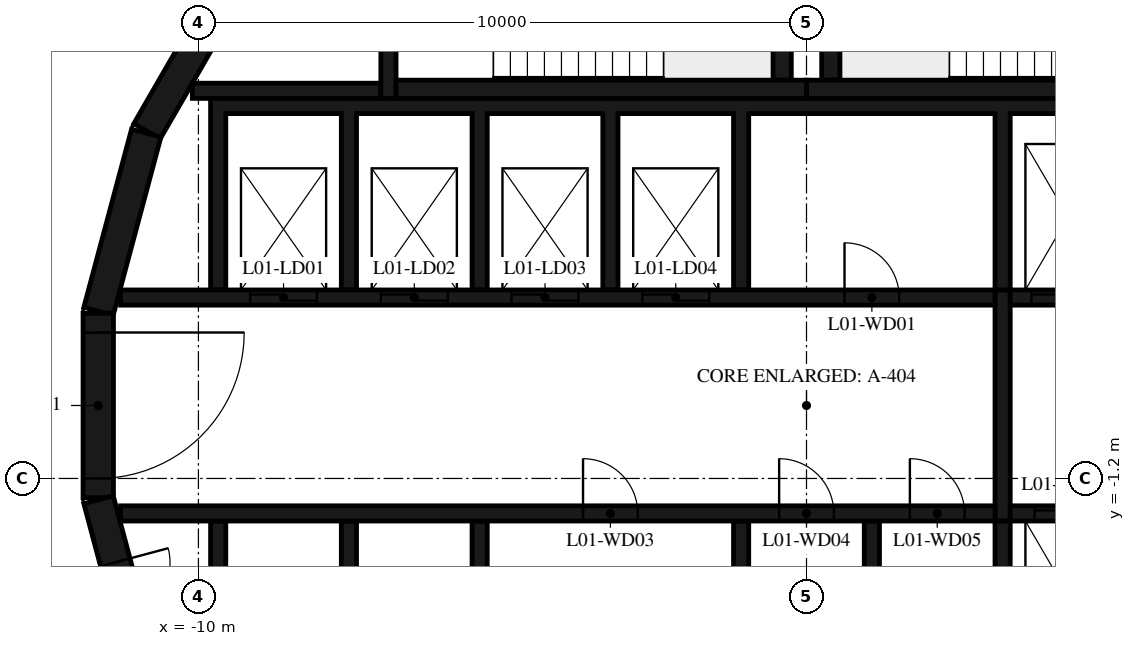
"""IFC4 building model, lengths in metres.
Left out: names, types, materials, properties, quantities, classifications, styles, units other than length and angle.
Written with IfcOpenShell. Run it as: python <this file> out.ifc"""

import sys

from ifc_helpers import new_model, si_unit, direction, frame, frame_2d, origin, place, context, subcontext, project, spatial, polyline, rectangle, outline, extrude, element, fill, save


model = new_model("IFC4")
c1 = context("Model", 3, precision=1e-05, world=origin(), true_north=direction((0.0, 1.0)))
c2 = subcontext(c1, "Body", "Model", "MODEL_VIEW")
j1 = project(units=[si_unit("LENGTHUNIT", "METRE"), si_unit("PLANEANGLEUNIT", "RADIAN")], contexts=[c1])
p1 = place(None, origin())
s1 = spatial("IfcSite", under=j1, at=p1, CompositionType="ELEMENT")
p2 = place(p1, origin())
s2 = spatial("IfcBuilding", under=s1, at=p2, CompositionType="ELEMENT")
p3 = place(p2, frame((0.0, 0.0, 9.0)))
s3 = spatial("IfcBuildingStorey", under=s2, at=p3, CompositionType="ELEMENT", Elevation=9.0)
for number, where, z_axis, x_axis in (
    (1, (-9.329, 7.137, 0.0), (0.0, 0.0, 1.0), (-0.5, -0.866, 0.0)),
    (2, (-10.858, 4.479, 0.0), (0.0, 0.0, 1.0), (-0.259, -0.966, 0.0)),
):
    element("IfcWall", number, at=place(p3, frame(where, z_axis=z_axis, x_axis=x_axis)), inside=s3, PredefinedType="SHEAR", context=c2, shape_type="SweptSolid", body=[
        extrude(rectangle(XDim=3.033, YDim=0.5, at=frame_2d((1.516, 0.0))), origin(), (0.0, 0.0, 1.0), 4.42),
    ])
p4 = place(p3, frame((-11.647, 1.516, 0.0), z_axis=(0.0, 0.0, 1.0), x_axis=(0.0, -1.0, 0.0)))
e3 = element("IfcWall", 3, at=p4, inside=s3, PredefinedType="SHEAR", context=c2, shape_type="SweptSolid", body=[
    extrude(rectangle(XDim=3.033, YDim=0.5, at=frame_2d((1.516, 0.0))), origin(), (0.0, 0.0, 1.0), 4.42),
])
p5 = place(p4, frame((0.316, 0.0, 0.0)))
e4 = element("IfcOpeningElement", 4, at=p5, cuts=e3, PredefinedType="OPENING", context=c2, shape_type="SweptSolid", body=[
    extrude(rectangle(XDim=2.4, YDim=2.1, at=frame_2d((1.2, 1.05))), frame((0.0, 0.26, 0.0), z_axis=(0.0, -1.0, 0.0), x_axis=(1.0, 0.0, 0.0)), (0.0, 0.0, 1.0), 0.52),
])
p6 = place(p3, frame((-11.643, -1.55, 0.0), z_axis=(0.0, 0.0, 1.0), x_axis=(0.258734743916, -0.965948410781, 0.0)))
e5 = element("IfcWall", 5, at=p6, inside=s3, PredefinedType="SHEAR", context=c2, shape_type="SweptSolid", body=[
    extrude(rectangle(XDim=3.033, YDim=0.5, at=frame_2d((1.516, 0.0))), origin(), (0.0, 0.0, 1.0), 4.42),
])
p7 = place(p6, frame((1.066, 0.0, 0.0)))
e6 = element("IfcOpeningElement", 6, at=p7, cuts=e5, PredefinedType="OPENING", context=c2, shape_type="SweptSolid", body=[
    extrude(rectangle(XDim=0.9, YDim=2.1, at=frame_2d((0.45, 1.05))), frame((0.0, 0.26, 0.0), z_axis=(0.0, -1.0, 0.0), x_axis=(1.0, 0.0, 0.0)), (0.0, 0.0, 1.0), 0.52),
])
p8 = place(p3, frame((0.0, 5.2, 0.0), z_axis=(0.0, 0.0, 1.0), x_axis=(1.0, 0.0, 0.0)))
e7 = element("IfcWall", 7, at=p8, inside=s3, PredefinedType="SHEAR", context=c2, shape_type="SweptSolid", body=[
    extrude(rectangle(XDim=6.75, YDim=0.3, at=frame_2d((3.375, 0.0))), origin(), (0.0, 0.0, 1.0), 4.42),
])
p9 = place(p3, frame((0.4, 5.35, 0.0), z_axis=(0.0, 0.0, 1.0), x_axis=(0.0, 1.0, 0.0)))
e8 = element("IfcWall", 8, at=p9, inside=s3, PredefinedType="SHEAR", context=c2, shape_type="SweptSolid", body=[
    extrude(rectangle(XDim=3.32, YDim=0.3, at=frame_2d((1.66, 0.0))), origin(), (0.0, 0.0, 1.0), 4.42),
])
p10 = place(p3, frame((-6.75, 5.2, 0.0), z_axis=(0.0, 0.0, 1.0), x_axis=(1.0, 0.0, 0.0)))
e9 = element("IfcWall", 9, at=p10, inside=s3, PredefinedType="SHEAR", context=c2, shape_type="SweptSolid", body=[
    extrude(rectangle(XDim=6.75, YDim=0.3, at=frame_2d((3.375, 0.0))), origin(), (0.0, 0.0, 1.0), 4.42),
])
p11 = place(p3, frame((-0.4, 5.35, 0.0), z_axis=(0.0, 0.0, 1.0), x_axis=(0.0, 1.0, 0.0)))
e10 = element("IfcWall", 10, at=p11, inside=s3, PredefinedType="SHEAR", context=c2, shape_type="SweptSolid", body=[
    extrude(rectangle(XDim=3.32, YDim=0.3, at=frame_2d((1.66, 0.0))), origin(), (0.0, 0.0, 1.0), 4.42),
])
p12 = place(p3, frame((-6.875, 8.97, 0.0), z_axis=(0.0, 0.0, 1.0), x_axis=(0.0, -1.0, 0.0)))
e11 = element("IfcWall", 11, at=p12, inside=s3, PredefinedType="SHEAR", context=c2, shape_type="SweptSolid", body=[
    extrude(rectangle(XDim=3.92, YDim=0.25, at=frame_2d((1.96, 0.0))), origin(), (0.0, 0.0, 1.0), 4.42),
])
p13 = place(p12, frame((1.61, 0.0, 0.0)))
e12 = element("IfcOpeningElement", 12, at=p13, cuts=e11, PredefinedType="OPENING", context=c2, shape_type="SweptSolid", body=[
    extrude(rectangle(XDim=1.2, YDim=2.1, at=frame_2d((0.6, 1.05))), frame((0.0, 0.135, 0.0), z_axis=(0.0, -1.0, 0.0), x_axis=(1.0, 0.0, 0.0)), (0.0, 0.0, 1.0), 0.27),
])
p14 = place(p3, frame((-7.0, 5.175, 0.0), z_axis=(0.0, 0.0, 1.0), x_axis=(-1.0, 0.0, 0.0)))
e13 = element("IfcWall", 13, at=p14, inside=s3, PredefinedType="SHEAR", context=c2, shape_type="SweptSolid", body=[
    extrude(rectangle(XDim=3.1, YDim=0.25, at=frame_2d((1.55, 0.0))), origin(), (0.0, 0.0, 1.0), 4.42),
])
p15 = place(p3, origin())
e14 = element("IfcWall", 14, at=p15, inside=s3, PredefinedType="SHEAR", context=c2, shape_type="SweptSolid", body=[
    extrude(outline(polyline([(-9.55, 4.8), (-7.65, 4.8), (-7.65, 1.9), (-7.4, 1.9), (-7.4, 4.8), (-5.5, 4.8), (-5.5, 1.9), (-5.25, 1.9), (-5.25, 4.8), (-3.35, 4.8), (-3.35, 1.9), (-3.1, 1.9), (-3.1, 4.8), (-1.2, 4.8), (-1.2, 1.9), (-0.95, 1.9), (-0.95, 4.8), (3.1, 4.8), (3.1, 1.9), (3.35, 1.9), (3.35, 4.8), (5.25, 4.8), (5.25, 1.9), (5.5, 1.9), (5.5, 4.8), (7.4, 4.8), (7.4, 1.9), (7.65, 1.9), (7.65, 4.8), (9.55, 4.8), (9.55, 1.9), (9.8, 1.9), (9.8, 4.8), (9.8, 5.05), (-9.8, 5.05), (-9.8, 4.8), (-9.8, 1.9), (-9.55, 1.9), (-9.55, 4.8)])), origin(), (0.0, 0.0, 1.0), 4.42),
])
p16 = place(p3, origin())
e15 = element("IfcWall", 15, at=p16, inside=s3, PredefinedType="SHEAR", context=c2, shape_type="SweptSolid", body=[
    extrude(outline(polyline([(9.8, -5.05), (9.8, -4.8), (9.8, -1.9), (9.55, -1.9), (9.55, -4.8), (7.65, -4.8), (7.65, -1.9), (7.4, -1.9), (7.4, -4.8), (5.5, -4.8), (5.5, -1.9), (5.25, -1.9), (5.25, -4.8), (3.35, -4.8), (3.35, -1.9), (3.1, -1.9), (3.1, -4.8), (1.2, -4.8), (1.2, -1.9), (0.95, -1.9), (0.95, -4.8), (-0.95, -4.8), (-0.95, -1.9), (-1.2, -1.9), (-1.2, -4.8), (-5.25, -4.8), (-5.25, -1.9), (-5.5, -1.9), (-5.5, -4.8), (-7.4, -4.8), (-7.4, -1.9), (-7.65, -1.9), (-7.65, -4.8), (-9.55, -4.8), (-9.55, -1.9), (-9.8, -1.9), (-9.8, -4.8), (-9.8, -5.05), (9.8, -5.05)])), origin(), (0.0, 0.0, 1.0), 4.42),
])
p17 = place(p3, frame((-11.28, 1.775, 0.0), z_axis=(0.0, 0.0, 1.0), x_axis=(1.0, 0.0, 0.0)))
e16 = element("IfcWall", 16, at=p17, inside=s3, PredefinedType="SHEAR", context=c2, shape_type="SweptSolid", body=[
    extrude(rectangle(XDim=14.38, YDim=0.25, at=frame_2d((7.19, 0.0))), origin(), (0.0, 0.0, 1.0), 4.42),
])
p18 = place(p17, frame((2.13, 0.0, 0.0)))
e17 = element("IfcOpeningElement", 17, at=p18, cuts=e16, PredefinedType="OPENING", context=c2, shape_type="SweptSolid", body=[
    extrude(rectangle(XDim=1.1, YDim=2.1, at=frame_2d((0.55, 1.05))), frame((0.0, 0.135, 0.0), z_axis=(0.0, -1.0, 0.0), x_axis=(1.0, 0.0, 0.0)), (0.0, 0.0, 1.0), 0.27),
])
p19 = place(p17, frame((4.28, 0.0, 0.0)))
e18 = element("IfcOpeningElement", 18, at=p19, cuts=e16, PredefinedType="OPENING", context=c2, shape_type="SweptSolid", body=[
    extrude(rectangle(XDim=1.1, YDim=2.1, at=frame_2d((0.55, 1.05))), frame((0.0, 0.135, 0.0), z_axis=(0.0, -1.0, 0.0), x_axis=(1.0, 0.0, 0.0)), (0.0, 0.0, 1.0), 0.27),
])
p20 = place(p17, frame((6.43, 0.0, 0.0)))
e19 = element("IfcOpeningElement", 19, at=p20, cuts=e16, PredefinedType="OPENING", context=c2, shape_type="SweptSolid", body=[
    extrude(rectangle(XDim=1.1, YDim=2.1, at=frame_2d((0.55, 1.05))), frame((0.0, 0.135, 0.0), z_axis=(0.0, -1.0, 0.0), x_axis=(1.0, 0.0, 0.0)), (0.0, 0.0, 1.0), 0.27),
])
p21 = place(p17, frame((8.58, 0.0, 0.0)))
e20 = element("IfcOpeningElement", 20, at=p21, cuts=e16, PredefinedType="OPENING", context=c2, shape_type="SweptSolid", body=[
    extrude(rectangle(XDim=1.1, YDim=2.1, at=frame_2d((0.55, 1.05))), frame((0.0, 0.135, 0.0), z_axis=(0.0, -1.0, 0.0), x_axis=(1.0, 0.0, 0.0)), (0.0, 0.0, 1.0), 0.27),
])
p22 = place(p17, frame((11.905, 0.0, 0.0)))
e21 = element("IfcOpeningElement", 21, at=p22, cuts=e16, PredefinedType="OPENING", context=c2, shape_type="SweptSolid", body=[
    extrude(rectangle(XDim=0.9, YDim=2.1, at=frame_2d((0.45, 1.05))), frame((0.0, 0.135, 0.0), z_axis=(0.0, -1.0, 0.0), x_axis=(1.0, 0.0, 0.0)), (0.0, 0.0, 1.0), 0.27),
])
p23 = place(p3, frame((3.35, 1.775, 0.0), z_axis=(0.0, 0.0, 1.0), x_axis=(1.0, 0.0, 0.0)))
e22 = element("IfcWall", 22, at=p23, inside=s3, PredefinedType="SHEAR", context=c2, shape_type="SweptSolid", body=[
    extrude(rectangle(XDim=7.93, YDim=0.25, at=frame_2d((3.965, 0.0))), origin(), (0.0, 0.0, 1.0), 4.42),
])
p24 = place(p23, frame((0.35, 0.0, 0.0)))
e23 = element("IfcOpeningElement", 23, at=p24, cuts=e22, PredefinedType="OPENING", context=c2, shape_type="SweptSolid", body=[
    extrude(rectangle(XDim=1.2, YDim=2.4, at=frame_2d((0.6, 1.2))), frame((0.0, 0.135, 0.0), z_axis=(0.0, -1.0, 0.0), x_axis=(1.0, 0.0, 0.0)), (0.0, 0.0, 1.0), 0.27),
])
p25 = place(p23, frame((2.5, 0.0, 0.0)))
e24 = element("IfcOpeningElement", 24, at=p25, cuts=e22, PredefinedType="OPENING", context=c2, shape_type="SweptSolid", body=[
    extrude(rectangle(XDim=1.2, YDim=2.4, at=frame_2d((0.6, 1.2))), frame((0.0, 0.135, 0.0), z_axis=(0.0, -1.0, 0.0), x_axis=(1.0, 0.0, 0.0)), (0.0, 0.0, 1.0), 0.27),
])
p26 = place(p23, frame((4.8, 0.0, 0.0)))
e25 = element("IfcOpeningElement", 25, at=p26, cuts=e22, PredefinedType="OPENING", context=c2, shape_type="SweptSolid", body=[
    extrude(rectangle(XDim=0.9, YDim=2.1, at=frame_2d((0.45, 1.05))), frame((0.0, 0.135, 0.0), z_axis=(0.0, -1.0, 0.0), x_axis=(1.0, 0.0, 0.0)), (0.0, 0.0, 1.0), 0.27),
])
p27 = place(p3, frame((-11.28, -1.775, 0.0), z_axis=(0.0, 0.0, 1.0), x_axis=(1.0, 0.0, 0.0)))
e26 = element("IfcWall", 26, at=p27, inside=s3, PredefinedType="SHEAR", context=c2, shape_type="SweptSolid", body=[
    extrude(rectangle(XDim=14.38, YDim=0.25, at=frame_2d((7.19, 0.0))), origin(), (0.0, 0.0, 1.0), 4.42),
])
p28 = place(p27, frame((7.605, 0.0, 0.0)))
e27 = element("IfcOpeningElement", 27, at=p28, cuts=e26, PredefinedType="OPENING", context=c2, shape_type="SweptSolid", body=[
    extrude(rectangle(XDim=0.9, YDim=2.1, at=frame_2d((0.45, 1.05))), frame((0.0, 0.135, 0.0), z_axis=(0.0, -1.0, 0.0), x_axis=(1.0, 0.0, 0.0)), (0.0, 0.0, 1.0), 0.27),
])
p29 = place(p27, frame((10.83, 0.0, 0.0)))
e28 = element("IfcOpeningElement", 28, at=p29, cuts=e26, PredefinedType="OPENING", context=c2, shape_type="SweptSolid", body=[
    extrude(rectangle(XDim=0.9, YDim=2.1, at=frame_2d((0.45, 1.05))), frame((0.0, 0.135, 0.0), z_axis=(0.0, -1.0, 0.0), x_axis=(1.0, 0.0, 0.0)), (0.0, 0.0, 1.0), 0.27),
])
p30 = place(p27, frame((12.98, 0.0, 0.0)))
e29 = element("IfcOpeningElement", 29, at=p30, cuts=e26, PredefinedType="OPENING", context=c2, shape_type="SweptSolid", body=[
    extrude(rectangle(XDim=0.9, YDim=2.1, at=frame_2d((0.45, 1.05))), frame((0.0, 0.135, 0.0), z_axis=(0.0, -1.0, 0.0), x_axis=(1.0, 0.0, 0.0)), (0.0, 0.0, 1.0), 0.27),
])
p31 = place(p3, frame((3.35, -1.775, 0.0), z_axis=(0.0, 0.0, 1.0), x_axis=(1.0, 0.0, 0.0)))
e30 = element("IfcWall", 30, at=p31, inside=s3, PredefinedType="SHEAR", context=c2, shape_type="SweptSolid", body=[
    extrude(rectangle(XDim=7.93, YDim=0.25, at=frame_2d((3.965, 0.0))), origin(), (0.0, 0.0, 1.0), 4.42),
])
p32 = place(p31, frame((0.4, 0.0, 0.0)))
e31 = element("IfcOpeningElement", 31, at=p32, cuts=e30, PredefinedType="OPENING", context=c2, shape_type="SweptSolid", body=[
    extrude(rectangle(XDim=1.1, YDim=2.4, at=frame_2d((0.55, 1.2))), frame((0.0, 0.135, 0.0), z_axis=(0.0, -1.0, 0.0), x_axis=(1.0, 0.0, 0.0)), (0.0, 0.0, 1.0), 0.27),
])
p33 = place(p31, frame((2.55, 0.0, 0.0)))
e32 = element("IfcOpeningElement", 32, at=p33, cuts=e30, PredefinedType="OPENING", context=c2, shape_type="SweptSolid", body=[
    extrude(rectangle(XDim=1.1, YDim=2.4, at=frame_2d((0.55, 1.2))), frame((0.0, 0.135, 0.0), z_axis=(0.0, -1.0, 0.0), x_axis=(1.0, 0.0, 0.0)), (0.0, 0.0, 1.0), 0.27),
])
p34 = place(p31, frame((4.7, 0.0, 0.0)))
e33 = element("IfcOpeningElement", 33, at=p34, cuts=e30, PredefinedType="OPENING", context=c2, shape_type="SweptSolid", body=[
    extrude(rectangle(XDim=1.1, YDim=2.4, at=frame_2d((0.55, 1.2))), frame((0.0, 0.135, 0.0), z_axis=(0.0, -1.0, 0.0), x_axis=(1.0, 0.0, 0.0)), (0.0, 0.0, 1.0), 0.27),
])
p35 = place(p3, frame((3.225, -1.9, 0.0), z_axis=(0.0, 0.0, 1.0), x_axis=(0.0, 1.0, 0.0)))
e34 = element("IfcWall", 34, at=p35, inside=s3, PredefinedType="SHEAR", context=c2, shape_type="SweptSolid", body=[
    extrude(rectangle(XDim=3.8, YDim=0.25, at=frame_2d((1.9, 0.0))), origin(), (0.0, 0.0, 1.0), 4.42),
])
p36 = place(p5, origin())
e35 = element("IfcDoor", 35, at=p36, inside=s3, OperationType="DOUBLE_DOOR_SINGLE_SWING", PredefinedType="DOOR", context=c2, shape_type="SweptSolid", body=[
    extrude(rectangle(XDim=2.4, YDim=2.1, at=frame_2d((1.2, 1.05))), frame((0.0, 0.025, 0.0), z_axis=(0.0, -1.0, 0.0), x_axis=(1.0, 0.0, 0.0)), (0.0, 0.0, 1.0), 0.05),
])
fill(e4, e35)
p37 = place(p18, origin())
e36 = element("IfcDoor", 36, at=p37, inside=s3, OperationType="DOUBLE_DOOR_SLIDING", PredefinedType="DOOR", context=c2, shape_type="SweptSolid", body=[
    extrude(rectangle(XDim=1.1, YDim=2.1, at=frame_2d((0.55, 1.05))), frame((0.0, 0.025, 0.0), z_axis=(0.0, -1.0, 0.0), x_axis=(1.0, 0.0, 0.0)), (0.0, 0.0, 1.0), 0.05),
])
fill(e17, e36)
p38 = place(p19, origin())
e37 = element("IfcDoor", 37, at=p38, inside=s3, OperationType="DOUBLE_DOOR_SLIDING", PredefinedType="DOOR", context=c2, shape_type="SweptSolid", body=[
    extrude(rectangle(XDim=1.1, YDim=2.1, at=frame_2d((0.55, 1.05))), frame((0.0, 0.025, 0.0), z_axis=(0.0, -1.0, 0.0), x_axis=(1.0, 0.0, 0.0)), (0.0, 0.0, 1.0), 0.05),
])
fill(e18, e37)
p39 = place(p20, origin())
e38 = element("IfcDoor", 38, at=p39, inside=s3, OperationType="DOUBLE_DOOR_SLIDING", PredefinedType="DOOR", context=c2, shape_type="SweptSolid", body=[
    extrude(rectangle(XDim=1.1, YDim=2.1, at=frame_2d((0.55, 1.05))), frame((0.0, 0.025, 0.0), z_axis=(0.0, -1.0, 0.0), x_axis=(1.0, 0.0, 0.0)), (0.0, 0.0, 1.0), 0.05),
])
fill(e19, e38)
p40 = place(p21, origin())
e39 = element("IfcDoor", 39, at=p40, inside=s3, OperationType="DOUBLE_DOOR_SLIDING", PredefinedType="DOOR", context=c2, shape_type="SweptSolid", body=[
    extrude(rectangle(XDim=1.1, YDim=2.1, at=frame_2d((0.55, 1.05))), frame((0.0, 0.025, 0.0), z_axis=(0.0, -1.0, 0.0), x_axis=(1.0, 0.0, 0.0)), (0.0, 0.0, 1.0), 0.05),
])
fill(e20, e39)
p41 = place(p24, origin())
e40 = element("IfcDoor", 40, at=p41, inside=s3, OperationType="DOUBLE_DOOR_SLIDING", PredefinedType="DOOR", context=c2, shape_type="SweptSolid", body=[
    extrude(rectangle(XDim=1.2, YDim=2.4, at=frame_2d((0.6, 1.2))), frame((0.0, 0.025, 0.0), z_axis=(0.0, -1.0, 0.0), x_axis=(1.0, 0.0, 0.0)), (0.0, 0.0, 1.0), 0.05),
])
fill(e23, e40)
p42 = place(p32, origin())
e41 = element("IfcDoor", 41, at=p42, inside=s3, OperationType="DOUBLE_DOOR_SLIDING", PredefinedType="DOOR", context=c2, shape_type="SweptSolid", body=[
    extrude(rectangle(XDim=1.1, YDim=2.4, at=frame_2d((0.55, 1.2))), frame((0.0, 0.025, 0.0), z_axis=(0.0, -1.0, 0.0), x_axis=(1.0, 0.0, 0.0)), (0.0, 0.0, 1.0), 0.05),
])
fill(e31, e41)
p43 = place(p22, origin())
e42 = element("IfcDoor", 42, at=p43, inside=s3, OperationType="SINGLE_SWING_RIGHT", PredefinedType="DOOR", context=c2, shape_type="SweptSolid", body=[
    extrude(rectangle(XDim=0.9, YDim=2.1, at=frame_2d((0.45, 1.05))), frame((0.0, 0.025, 0.0), z_axis=(0.0, -1.0, 0.0), x_axis=(1.0, 0.0, 0.0)), (0.0, 0.0, 1.0), 0.05),
])
fill(e21, e42)
p44 = place(p28, origin())
e43 = element("IfcDoor", 43, at=p44, inside=s3, OperationType="SINGLE_SWING_RIGHT", PredefinedType="DOOR", context=c2, shape_type="SweptSolid", body=[
    extrude(rectangle(XDim=0.9, YDim=2.1, at=frame_2d((0.45, 1.05))), frame((0.0, 0.025, 0.0), z_axis=(0.0, -1.0, 0.0), x_axis=(1.0, 0.0, 0.0)), (0.0, 0.0, 1.0), 0.05),
])
fill(e27, e43)
p45 = place(p29, origin())
e44 = element("IfcDoor", 44, at=p45, inside=s3, OperationType="SINGLE_SWING_LEFT", PredefinedType="DOOR", context=c2, shape_type="SweptSolid", body=[
    extrude(rectangle(XDim=0.9, YDim=2.1, at=frame_2d((0.45, 1.05))), frame((0.0, 0.025, 0.0), z_axis=(0.0, -1.0, 0.0), x_axis=(1.0, 0.0, 0.0)), (0.0, 0.0, 1.0), 0.05),
])
fill(e28, e44)
p46 = place(p30, origin())
e45 = element("IfcDoor", 45, at=p46, inside=s3, OperationType="SINGLE_SWING_RIGHT", PredefinedType="DOOR", context=c2, shape_type="SweptSolid", body=[
    extrude(rectangle(XDim=0.9, YDim=2.1, at=frame_2d((0.45, 1.05))), frame((0.0, 0.025, 0.0), z_axis=(0.0, -1.0, 0.0), x_axis=(1.0, 0.0, 0.0)), (0.0, 0.0, 1.0), 0.05),
])
fill(e29, e45)
p47 = place(p7, origin())
e46 = element("IfcDoor", 46, at=p47, inside=s3, OperationType="SINGLE_SWING_LEFT", PredefinedType="DOOR", context=c2, shape_type="SweptSolid", body=[
    extrude(rectangle(XDim=0.9, YDim=2.1, at=frame_2d((0.45, 1.05))), frame((0.0, 0.025, 0.0), z_axis=(0.0, -1.0, 0.0), x_axis=(1.0, 0.0, 0.0)), (0.0, 0.0, 1.0), 0.05),
])
fill(e6, e46)
save(model, sys.argv[1])
